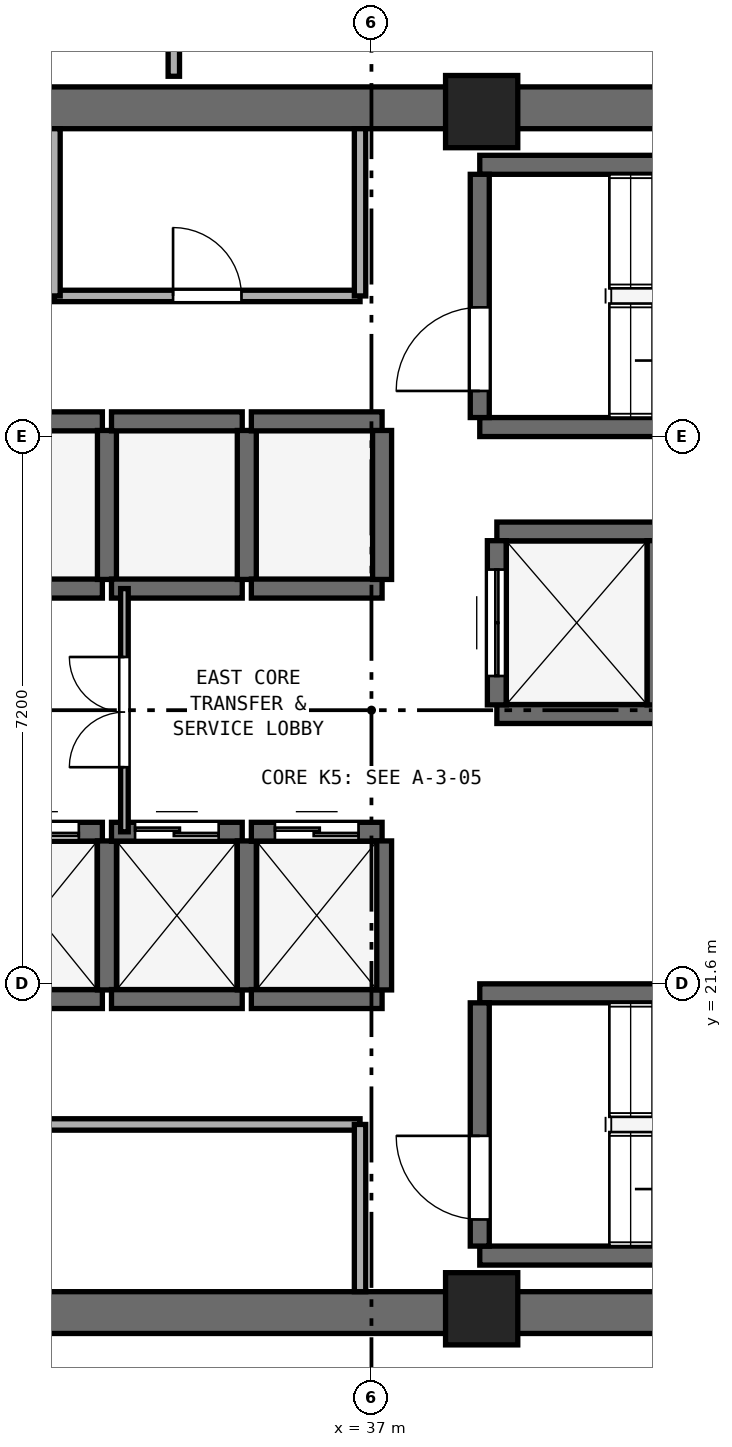
"""IFC4 building model, lengths in metres.
Left out: names, types, materials, properties, quantities, classifications, styles, units other than length and angle.
Written with IfcOpenShell. Run it as: python <this file> out.ifc"""

import sys

from ifc_helpers import new_model, si_unit, direction, frame, frame_2d, origin, origin_2d, place, context, subcontext, project, spatial, rectangle, extrude, element, fill, save


model = new_model("IFC4")
c1 = context("Model", 3, precision=1e-05, world=origin(), true_north=direction((0.0, 1.0)))
c2 = subcontext(c1, "Body", "Model", "MODEL_VIEW")
j1 = project(units=[si_unit("LENGTHUNIT", "METRE"), si_unit("PLANEANGLEUNIT", "RADIAN")], contexts=[c1])
p1 = place(None, origin())
s1 = spatial("IfcSite", under=j1, at=p1, CompositionType="ELEMENT")
p2 = place(p1, origin())
s2 = spatial("IfcBuilding", under=s1, at=p2, CompositionType="ELEMENT")
p3 = place(p2, frame((0.0, 0.0, 197.2)))
s3 = spatial("IfcBuildingStorey", under=s2, at=p3, CompositionType="ELEMENT", Elevation=197.2)
for number, where, z_axis, x_axis in (
    (1, (25.4, 17.275, 0.0), (0.0, 0.0, 1.0), (1.0, 0.0, 0.0)),
    (2, (25.4, 33.125, 0.0), (0.0, 0.0, 1.0), (1.0, 0.0, 0.0)),
):
    element("IfcWall", number, at=place(p3, frame(where, z_axis=z_axis, x_axis=x_axis)), inside=s3, PredefinedType="SHEAR", context=c2, shape_type="SweptSolid", body=[
        extrude(rectangle(XDim=23.2, YDim=0.55, at=frame_2d((11.6, 0.0))), origin(), (0.0, 0.0, 1.0), 3.54),
    ])
for number, where, z_axis, x_axis in (
    (3, (38.45, 17.325, 0.0), (0.0, 0.0, 1.0), (1.0, 0.0, 0.0)),
    (4, (38.45, 33.075, 0.0), (0.0, 0.0, 1.0), (1.0, 0.0, 0.0)),
):
    element("IfcColumn", number, at=place(p3, frame(where, z_axis=z_axis, x_axis=x_axis)), inside=s3, PredefinedType="PILASTER", context=c2, shape_type="SweptSolid", body=[
        extrude(rectangle(XDim=0.95, YDim=0.95, at=origin_2d()), origin(), (0.0, 0.0, 1.0), 3.8),
    ])
for number, where, z_axis, x_axis in (
    (5, (38.425, 28.925, 0.0), (0.0, 0.0, 1.0), (1.0, 0.0, 0.0)),
    (6, (38.425, 32.375, 0.0), (0.0, 0.0, 1.0), (1.0, 0.0, 0.0)),
):
    element("IfcWall", number, at=place(p3, frame(where, z_axis=z_axis, x_axis=x_axis)), inside=s3, PredefinedType="SHEAR", context=c2, shape_type="SweptSolid", body=[
        extrude(rectangle(XDim=7.3, YDim=0.25, at=frame_2d((3.65, 0.0))), origin(), (0.0, 0.0, 1.0), 3.54),
    ])
p4 = place(p3, frame((38.425, 29.05, 0.0), z_axis=(0.0, 0.0, 1.0), x_axis=(0.0, 1.0, 0.0)))
e7 = element("IfcWall", 7, at=p4, inside=s3, PredefinedType="SHEAR", context=c2, shape_type="SweptSolid", body=[
    extrude(rectangle(XDim=3.2, YDim=0.25, at=frame_2d((1.6, 0.0))), origin(), (0.0, 0.0, 1.0), 3.54),
])
p5 = place(p4, frame((0.35, 0.0, 0.0)))
e8 = element("IfcOpeningElement", 8, at=p5, cuts=e7, PredefinedType="OPENING", context=c2, shape_type="SweptSolid", body=[
    extrude(rectangle(XDim=1.1, YDim=2.15, at=frame_2d((0.55, 1.075))), frame((0.0, 0.135, 0.0), z_axis=(0.0, -1.0, 0.0), x_axis=(1.0, 0.0, 0.0)), (0.0, 0.0, 1.0), 0.27),
])
for number, where, z_axis, x_axis in (
    (9, (38.425, 18.025, 0.0), (0.0, 0.0, 1.0), (1.0, 0.0, 0.0)),
    (10, (38.425, 21.475, 0.0), (0.0, 0.0, 1.0), (1.0, 0.0, 0.0)),
):
    element("IfcWall", number, at=place(p3, frame(where, z_axis=z_axis, x_axis=x_axis)), inside=s3, PredefinedType="SHEAR", context=c2, shape_type="SweptSolid", body=[
        extrude(rectangle(XDim=7.3, YDim=0.25, at=frame_2d((3.65, 0.0))), origin(), (0.0, 0.0, 1.0), 3.54),
    ])
p6 = place(p3, frame((38.425, 18.15, 0.0), z_axis=(0.0, 0.0, 1.0), x_axis=(0.0, 1.0, 0.0)))
e11 = element("IfcWall", 11, at=p6, inside=s3, PredefinedType="SHEAR", context=c2, shape_type="SweptSolid", body=[
    extrude(rectangle(XDim=3.2, YDim=0.25, at=frame_2d((1.6, 0.0))), origin(), (0.0, 0.0, 1.0), 3.54),
])
p7 = place(p6, frame((0.35, 0.0, 0.0)))
e12 = element("IfcOpeningElement", 12, at=p7, cuts=e11, PredefinedType="OPENING", context=c2, shape_type="SweptSolid", body=[
    extrude(rectangle(XDim=1.1, YDim=2.15, at=frame_2d((0.55, 1.075))), frame((0.0, 0.135, 0.0), z_axis=(0.0, -1.0, 0.0), x_axis=(1.0, 0.0, 0.0)), (0.0, 0.0, 1.0), 0.27),
])
p8 = place(p3, frame((31.74, 21.4, 0.0), z_axis=(0.0, 0.0, 1.0), x_axis=(1.0, 0.0, 0.0)))
e13 = element("IfcWall", 13, at=p8, inside=s3, PredefinedType="SHEAR", context=c2, shape_type="SweptSolid", body=[
    extrude(rectangle(XDim=1.72, YDim=0.25, at=frame_2d((0.86, 0.0))), origin(), (0.0, 0.0, 1.0), 3.54),
])
p9 = place(p3, frame((31.74, 23.6, 0.0), z_axis=(0.0, 0.0, 1.0), x_axis=(1.0, 0.0, 0.0)))
e14 = element("IfcWall", 14, at=p9, inside=s3, PredefinedType="SHEAR", context=c2, shape_type="SweptSolid", body=[
    extrude(rectangle(XDim=1.72, YDim=0.25, at=frame_2d((0.86, 0.0))), origin(), (0.0, 0.0, 1.0), 3.54),
])
p10 = place(p9, frame((0.31, 0.0, 0.0)))
e15 = element("IfcOpeningElement", 15, at=p10, cuts=e14, PredefinedType="OPENING", context=c2, shape_type="SweptSolid", body=[
    extrude(rectangle(XDim=1.1, YDim=2.15, at=frame_2d((0.55, 1.075))), frame((0.0, 0.135, 0.0), z_axis=(0.0, -1.0, 0.0), x_axis=(1.0, 0.0, 0.0)), (0.0, 0.0, 1.0), 0.27),
])
p11 = place(p3, frame((33.52, 21.52, 0.0), z_axis=(0.0, 0.0, 1.0), x_axis=(0.0, 1.0, 0.0)))
e16 = element("IfcWall", 16, at=p11, inside=s3, PredefinedType="SHEAR", context=c2, shape_type="SweptSolid", body=[
    extrude(rectangle(XDim=1.96, YDim=0.25, at=frame_2d((0.98, 0.0))), origin(), (0.0, 0.0, 1.0), 3.54),
])
p12 = place(p3, frame((33.58, 21.4, 0.0), z_axis=(0.0, 0.0, 1.0), x_axis=(1.0, 0.0, 0.0)))
e17 = element("IfcWall", 17, at=p12, inside=s3, PredefinedType="SHEAR", context=c2, shape_type="SweptSolid", body=[
    extrude(rectangle(XDim=1.72, YDim=0.25, at=frame_2d((0.86, 0.0))), origin(), (0.0, 0.0, 1.0), 3.54),
])
p13 = place(p3, frame((33.58, 23.6, 0.0), z_axis=(0.0, 0.0, 1.0), x_axis=(1.0, 0.0, 0.0)))
e18 = element("IfcWall", 18, at=p13, inside=s3, PredefinedType="SHEAR", context=c2, shape_type="SweptSolid", body=[
    extrude(rectangle(XDim=1.72, YDim=0.25, at=frame_2d((0.86, 0.0))), origin(), (0.0, 0.0, 1.0), 3.54),
])
p14 = place(p13, frame((0.31, 0.0, 0.0)))
e19 = element("IfcOpeningElement", 19, at=p14, cuts=e18, PredefinedType="OPENING", context=c2, shape_type="SweptSolid", body=[
    extrude(rectangle(XDim=1.1, YDim=2.15, at=frame_2d((0.55, 1.075))), frame((0.0, 0.135, 0.0), z_axis=(0.0, -1.0, 0.0), x_axis=(1.0, 0.0, 0.0)), (0.0, 0.0, 1.0), 0.27),
])
p15 = place(p3, frame((35.36, 21.52, 0.0), z_axis=(0.0, 0.0, 1.0), x_axis=(0.0, 1.0, 0.0)))
e20 = element("IfcWall", 20, at=p15, inside=s3, PredefinedType="SHEAR", context=c2, shape_type="SweptSolid", body=[
    extrude(rectangle(XDim=1.96, YDim=0.25, at=frame_2d((0.98, 0.0))), origin(), (0.0, 0.0, 1.0), 3.54),
])
p16 = place(p3, frame((35.42, 21.4, 0.0), z_axis=(0.0, 0.0, 1.0), x_axis=(1.0, 0.0, 0.0)))
e21 = element("IfcWall", 21, at=p16, inside=s3, PredefinedType="SHEAR", context=c2, shape_type="SweptSolid", body=[
    extrude(rectangle(XDim=1.72, YDim=0.25, at=frame_2d((0.86, 0.0))), origin(), (0.0, 0.0, 1.0), 3.54),
])
p17 = place(p3, frame((35.42, 23.6, 0.0), z_axis=(0.0, 0.0, 1.0), x_axis=(1.0, 0.0, 0.0)))
e22 = element("IfcWall", 22, at=p17, inside=s3, PredefinedType="SHEAR", context=c2, shape_type="SweptSolid", body=[
    extrude(rectangle(XDim=1.72, YDim=0.25, at=frame_2d((0.86, 0.0))), origin(), (0.0, 0.0, 1.0), 3.54),
])
p18 = place(p17, frame((0.31, 0.0, 0.0)))
e23 = element("IfcOpeningElement", 23, at=p18, cuts=e22, PredefinedType="OPENING", context=c2, shape_type="SweptSolid", body=[
    extrude(rectangle(XDim=1.1, YDim=2.15, at=frame_2d((0.55, 1.075))), frame((0.0, 0.135, 0.0), z_axis=(0.0, -1.0, 0.0), x_axis=(1.0, 0.0, 0.0)), (0.0, 0.0, 1.0), 0.27),
])
p19 = place(p3, frame((37.14, 21.52, 0.0), z_axis=(0.0, 0.0, 1.0), x_axis=(0.0, 1.0, 0.0)))
e24 = element("IfcWall", 24, at=p19, inside=s3, PredefinedType="SHEAR", context=c2, shape_type="SweptSolid", body=[
    extrude(rectangle(XDim=1.96, YDim=0.25, at=frame_2d((0.98, 0.0))), origin(), (0.0, 0.0, 1.0), 3.54),
])
for number, where, z_axis, x_axis in (
    (25, (31.74, 26.8, 0.0), (0.0, 0.0, 1.0), (1.0, 0.0, 0.0)),
    (26, (31.74, 29.0, 0.0), (0.0, 0.0, 1.0), (1.0, 0.0, 0.0)),
):
    element("IfcWall", number, at=place(p3, frame(where, z_axis=z_axis, x_axis=x_axis)), inside=s3, PredefinedType="SHEAR", context=c2, shape_type="SweptSolid", body=[
        extrude(rectangle(XDim=1.72, YDim=0.25, at=frame_2d((0.86, 0.0))), origin(), (0.0, 0.0, 1.0), 3.54),
    ])
p20 = place(p3, frame((33.52, 26.92, 0.0), z_axis=(0.0, 0.0, 1.0), x_axis=(0.0, 1.0, 0.0)))
e27 = element("IfcWall", 27, at=p20, inside=s3, PredefinedType="SHEAR", context=c2, shape_type="SweptSolid", body=[
    extrude(rectangle(XDim=1.96, YDim=0.25, at=frame_2d((0.98, 0.0))), origin(), (0.0, 0.0, 1.0), 3.54),
])
for number, where, z_axis, x_axis in (
    (28, (33.58, 26.8, 0.0), (0.0, 0.0, 1.0), (1.0, 0.0, 0.0)),
    (29, (33.58, 29.0, 0.0), (0.0, 0.0, 1.0), (1.0, 0.0, 0.0)),
):
    element("IfcWall", number, at=place(p3, frame(where, z_axis=z_axis, x_axis=x_axis)), inside=s3, PredefinedType="SHEAR", context=c2, shape_type="SweptSolid", body=[
        extrude(rectangle(XDim=1.72, YDim=0.25, at=frame_2d((0.86, 0.0))), origin(), (0.0, 0.0, 1.0), 3.54),
    ])
p21 = place(p3, frame((35.36, 26.92, 0.0), z_axis=(0.0, 0.0, 1.0), x_axis=(0.0, 1.0, 0.0)))
e30 = element("IfcWall", 30, at=p21, inside=s3, PredefinedType="SHEAR", context=c2, shape_type="SweptSolid", body=[
    extrude(rectangle(XDim=1.96, YDim=0.25, at=frame_2d((0.98, 0.0))), origin(), (0.0, 0.0, 1.0), 3.54),
])
for number, where, z_axis, x_axis in (
    (31, (35.42, 26.8, 0.0), (0.0, 0.0, 1.0), (1.0, 0.0, 0.0)),
    (32, (35.42, 29.0, 0.0), (0.0, 0.0, 1.0), (1.0, 0.0, 0.0)),
):
    element("IfcWall", number, at=place(p3, frame(where, z_axis=z_axis, x_axis=x_axis)), inside=s3, PredefinedType="SHEAR", context=c2, shape_type="SweptSolid", body=[
        extrude(rectangle(XDim=1.72, YDim=0.25, at=frame_2d((0.86, 0.0))), origin(), (0.0, 0.0, 1.0), 3.54),
    ])
p22 = place(p3, frame((37.14, 26.92, 0.0), z_axis=(0.0, 0.0, 1.0), x_axis=(0.0, 1.0, 0.0)))
e33 = element("IfcWall", 33, at=p22, inside=s3, PredefinedType="SHEAR", context=c2, shape_type="SweptSolid", body=[
    extrude(rectangle(XDim=1.96, YDim=0.25, at=frame_2d((0.98, 0.0))), origin(), (0.0, 0.0, 1.0), 3.54),
])
for number, where, z_axis, x_axis in (
    (34, (38.65, 25.15, 0.0), (0.0, 0.0, 1.0), (1.0, 0.0, 0.0)),
    (35, (38.65, 27.55, 0.0), (0.0, 0.0, 1.0), (1.0, 0.0, 0.0)),
):
    element("IfcWall", number, at=place(p3, frame(where, z_axis=z_axis, x_axis=x_axis)), inside=s3, PredefinedType="SHEAR", context=c2, shape_type="SweptSolid", body=[
        extrude(rectangle(XDim=2.1, YDim=0.25, at=frame_2d((1.05, 0.0))), origin(), (0.0, 0.0, 1.0), 3.54),
    ])
p23 = place(p3, frame((38.65, 25.27, 0.0), z_axis=(0.0, 0.0, 1.0), x_axis=(0.0, 1.0, 0.0)))
e36 = element("IfcWall", 36, at=p23, inside=s3, PredefinedType="SHEAR", context=c2, shape_type="SweptSolid", body=[
    extrude(rectangle(XDim=2.16, YDim=0.25, at=frame_2d((1.08, 0.0))), origin(), (0.0, 0.0, 1.0), 3.54),
])
p24 = place(p23, frame((0.38, 0.0, 0.0)))
e37 = element("IfcOpeningElement", 37, at=p24, cuts=e36, PredefinedType="OPENING", context=c2, shape_type="SweptSolid", body=[
    extrude(rectangle(XDim=1.4, YDim=2.2, at=frame_2d((0.7, 1.1))), frame((0.0, 0.135, 0.0), z_axis=(0.0, -1.0, 0.0), x_axis=(1.0, 0.0, 0.0)), (0.0, 0.0, 1.0), 0.27),
])
p25 = place(p3, frame((40.75, 25.27, 0.0), z_axis=(0.0, 0.0, 1.0), x_axis=(0.0, 1.0, 0.0)))
e38 = element("IfcWall", 38, at=p25, inside=s3, PredefinedType="SHEAR", context=c2, shape_type="SweptSolid", body=[
    extrude(rectangle(XDim=2.16, YDim=0.25, at=frame_2d((1.08, 0.0))), origin(), (0.0, 0.0, 1.0), 3.54),
])
p26 = place(p3, frame((32.83, 30.65, 0.0), z_axis=(0.0, 0.0, 1.0), x_axis=(1.0, 0.0, 0.0)))
e39 = element("IfcWall", 39, at=p26, inside=s3, PredefinedType="PARTITIONING", context=c2, shape_type="SweptSolid", body=[
    extrude(rectangle(XDim=4.02, YDim=0.15, at=frame_2d((2.01, 0.0))), origin(), (0.0, 0.0, 1.0), 3.54),
])
p27 = place(p26, frame((1.56, 0.0, 0.0)))
e40 = element("IfcOpeningElement", 40, at=p27, cuts=e39, PredefinedType="OPENING", context=c2, shape_type="SweptSolid", body=[
    extrude(rectangle(XDim=0.9, YDim=2.1, at=frame_2d((0.45, 1.05))), frame((0.0, 0.085, 0.0), z_axis=(0.0, -1.0, 0.0), x_axis=(1.0, 0.0, 0.0)), (0.0, 0.0, 1.0), 0.17),
])
for number, where, z_axis, x_axis in (
    (41, (32.83, 30.65, 0.0), (0.0, 0.0, 1.0), (0.0, 1.0, 0.0)),
    (42, (36.85, 30.65, 0.0), (0.0, 0.0, 1.0), (0.0, 1.0, 0.0)),
):
    element("IfcWall", number, at=place(p3, frame(where, z_axis=z_axis, x_axis=x_axis)), inside=s3, PredefinedType="PARTITIONING", context=c2, shape_type="SweptSolid", body=[
        extrude(rectangle(XDim=2.2, YDim=0.15, at=frame_2d((1.1, 0.0))), origin(), (0.0, 0.0, 1.0), 3.54),
    ])
p28 = place(p3, frame((26.07, 19.75, 0.0), z_axis=(0.0, 0.0, 1.0), x_axis=(1.0, 0.0, 0.0)))
e43 = element("IfcWall", 43, at=p28, inside=s3, PredefinedType="PARTITIONING", context=c2, shape_type="SweptSolid", body=[
    extrude(rectangle(XDim=10.78, YDim=0.15, at=frame_2d((5.39, 0.0))), origin(), (0.0, 0.0, 1.0), 3.54),
])
p29 = place(p28, frame((4.915, 0.0, 0.0)))
e44 = element("IfcOpeningElement", 44, at=p29, cuts=e43, PredefinedType="OPENING", context=c2, shape_type="SweptSolid", body=[
    extrude(rectangle(XDim=0.95, YDim=2.1, at=frame_2d((0.475, 1.05))), frame((0.0, 0.085, 0.0), z_axis=(0.0, -1.0, 0.0), x_axis=(1.0, 0.0, 0.0)), (0.0, 0.0, 1.0), 0.17),
])
p30 = place(p3, frame((36.85, 17.55, 0.0), z_axis=(0.0, 0.0, 1.0), x_axis=(0.0, 1.0, 0.0)))
e45 = element("IfcWall", 45, at=p30, inside=s3, PredefinedType="PARTITIONING", context=c2, shape_type="SweptSolid", body=[
    extrude(rectangle(XDim=2.2, YDim=0.15, at=frame_2d((1.1, 0.0))), origin(), (0.0, 0.0, 1.0), 3.54),
])
p31 = place(p3, frame((33.75, 23.6, 0.0), z_axis=(0.0, 0.0, 1.0), x_axis=(0.0, 1.0, 0.0)))
e46 = element("IfcWall", 46, at=p31, inside=s3, PredefinedType="PARTITIONING", context=c2, shape_type="SweptSolid", body=[
    extrude(rectangle(XDim=3.2, YDim=0.1, at=frame_2d((1.6, 0.0))), origin(), (0.0, 0.0, 1.0), 3.54),
])
p32 = place(p31, frame((0.85, 0.0, 0.0)))
e47 = element("IfcOpeningElement", 47, at=p32, cuts=e46, PredefinedType="OPENING", context=c2, shape_type="SweptSolid", body=[
    extrude(rectangle(XDim=1.45, YDim=2.12, at=frame_2d((0.725, 1.06))), frame((0.0, 0.06, 0.0), z_axis=(0.0, -1.0, 0.0), x_axis=(1.0, 0.0, 0.0)), (0.0, 0.0, 1.0), 0.12),
])
p33 = place(p3, frame((34.4, 33.54, 0.0), z_axis=(0.0, 0.0, 1.0), x_axis=(0.0, 1.0, 0.0)))
e48 = element("IfcWall", 48, at=p33, inside=s3, PredefinedType="PARTITIONING", context=c2, shape_type="SweptSolid", body=[
    extrude(rectangle(XDim=1.81, YDim=0.15, at=frame_2d((0.905, 0.0))), origin(), (0.0, 0.0, 1.0), 3.54),
])
p34 = place(p5, origin())
e49 = element("IfcDoor", 49, at=p34, inside=s3, OperationType="SINGLE_SWING_LEFT", PredefinedType="DOOR", context=c2, shape_type="SweptSolid", body=[
    extrude(rectangle(XDim=1.1, YDim=2.15, at=frame_2d((0.55, 1.075))), frame((0.0, 0.025, 0.0), z_axis=(0.0, -1.0, 0.0), x_axis=(1.0, 0.0, 0.0)), (0.0, 0.0, 1.0), 0.05),
])
fill(e8, e49)
p35 = place(p7, origin())
e50 = element("IfcDoor", 50, at=p35, inside=s3, OperationType="SINGLE_SWING_RIGHT", PredefinedType="DOOR", context=c2, shape_type="SweptSolid", body=[
    extrude(rectangle(XDim=1.1, YDim=2.15, at=frame_2d((0.55, 1.075))), frame((0.0, 0.025, 0.0), z_axis=(0.0, -1.0, 0.0), x_axis=(1.0, 0.0, 0.0)), (0.0, 0.0, 1.0), 0.05),
])
fill(e12, e50)
p36 = place(p10, origin())
e51 = element("IfcDoor", 51, at=p36, inside=s3, OperationType="DOUBLE_DOOR_SLIDING", PredefinedType="DOOR", context=c2, shape_type="SweptSolid", body=[
    extrude(rectangle(XDim=1.1, YDim=2.15, at=frame_2d((0.55, 1.075))), frame((0.0, 0.025, 0.0), z_axis=(0.0, -1.0, 0.0), x_axis=(1.0, 0.0, 0.0)), (0.0, 0.0, 1.0), 0.05),
])
fill(e15, e51)
p37 = place(p14, origin())
e52 = element("IfcDoor", 52, at=p37, inside=s3, OperationType="DOUBLE_DOOR_SLIDING", PredefinedType="DOOR", context=c2, shape_type="SweptSolid", body=[
    extrude(rectangle(XDim=1.1, YDim=2.15, at=frame_2d((0.55, 1.075))), frame((0.0, 0.025, 0.0), z_axis=(0.0, -1.0, 0.0), x_axis=(1.0, 0.0, 0.0)), (0.0, 0.0, 1.0), 0.05),
])
fill(e19, e52)
p38 = place(p18, origin())
e53 = element("IfcDoor", 53, at=p38, inside=s3, OperationType="DOUBLE_DOOR_SLIDING", PredefinedType="DOOR", context=c2, shape_type="SweptSolid", body=[
    extrude(rectangle(XDim=1.1, YDim=2.15, at=frame_2d((0.55, 1.075))), frame((0.0, 0.025, 0.0), z_axis=(0.0, -1.0, 0.0), x_axis=(1.0, 0.0, 0.0)), (0.0, 0.0, 1.0), 0.05),
])
fill(e23, e53)
p39 = place(p24, origin())
e54 = element("IfcDoor", 54, at=p39, inside=s3, OperationType="DOUBLE_DOOR_SLIDING", PredefinedType="DOOR", context=c2, shape_type="SweptSolid", body=[
    extrude(rectangle(XDim=1.4, YDim=2.2, at=frame_2d((0.7, 1.1))), frame((0.0, 0.025, 0.0), z_axis=(0.0, -1.0, 0.0), x_axis=(1.0, 0.0, 0.0)), (0.0, 0.0, 1.0), 0.05),
])
fill(e37, e54)
p40 = place(p27, origin())
e55 = element("IfcDoor", 55, at=p40, inside=s3, OperationType="SINGLE_SWING_LEFT", PredefinedType="DOOR", context=c2, shape_type="SweptSolid", body=[
    extrude(rectangle(XDim=0.9, YDim=2.1, at=frame_2d((0.45, 1.05))), frame((0.0, 0.025, 0.0), z_axis=(0.0, -1.0, 0.0), x_axis=(1.0, 0.0, 0.0)), (0.0, 0.0, 1.0), 0.05),
])
fill(e40, e55)
p41 = place(p32, origin())
e56 = element("IfcDoor", 56, at=p41, inside=s3, OperationType="DOUBLE_DOOR_SINGLE_SWING", PredefinedType="DOOR", context=c2, shape_type="SweptSolid", body=[
    extrude(rectangle(XDim=1.45, YDim=2.12, at=frame_2d((0.725, 1.06))), frame((0.0, 0.025, 0.0), z_axis=(0.0, -1.0, 0.0), x_axis=(1.0, 0.0, 0.0)), (0.0, 0.0, 1.0), 0.05),
])
fill(e47, e56)
save(model, sys.argv[1])
